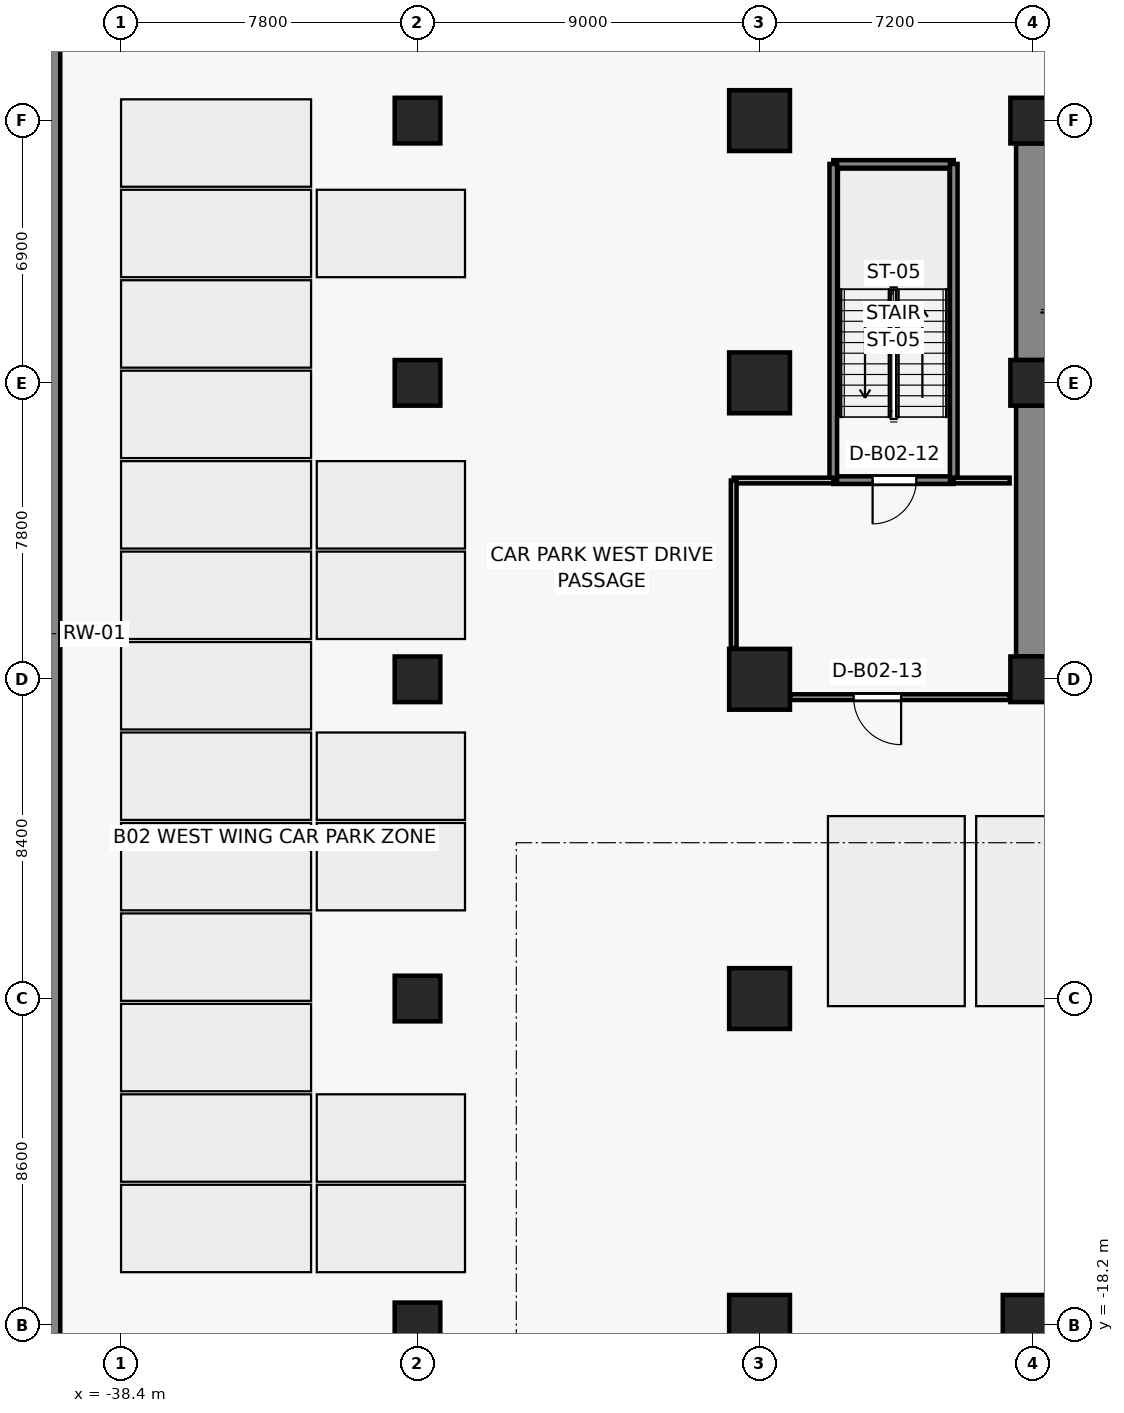
"""IFC4 building model, lengths in metres.
Left out: names, types, materials, properties, quantities, classifications, styles, units other than length and angle.
Written with IfcOpenShell. Run it as: python <this file> out.ifc"""

import sys

from ifc_helpers import new_model, si_unit, direction, frame, frame_2d, origin, origin_2d, place, context, subcontext, project, spatial, rectangle, extrude, source, transform, mapped, element, fill, save


model = new_model("IFC4")
c1 = context("Model", 3, precision=1e-05, world=origin(), true_north=direction((0.0, 1.0)))
c2 = subcontext(c1, "Body", "Model", "MODEL_VIEW")
j1 = project(units=[si_unit("LENGTHUNIT", "METRE"), si_unit("PLANEANGLEUNIT", "RADIAN")], contexts=[c1])
p1 = place(None, origin())
s1 = spatial("IfcSite", under=j1, at=p1, CompositionType="ELEMENT")
p2 = place(p1, origin())
s2 = spatial("IfcBuilding", under=s1, at=p2, CompositionType="ELEMENT")
p3 = place(p2, frame((0.0, 0.0, -8.8)))
s3 = spatial("IfcBuildingStorey", under=s2, at=p3, CompositionType="ELEMENT", Elevation=-8.8)
p4 = place(p3, frame((-40.4, -22.8, 0.0), z_axis=(0.0, 0.0, 1.0), x_axis=(0.0, 1.0, 0.0)))
e1 = element("IfcWall", 1, at=p4, inside=s3, PredefinedType="USERDEFINED", context=c2, shape_type="SweptSolid", body=[
    extrude(rectangle(XDim=45.6, YDim=0.8, at=frame_2d((22.8, 0.0))), origin(), (0.0, 0.0, 1.0), 4.12),
])
for number, where, z_axis, x_axis in (
    (2, (-14.4, -1.2, 0.0), (0.0, 0.0, 1.0), (1.0, 0.0, 0.0)),
    (3, (-14.4, 6.6, 0.0), (0.0, 0.0, 1.0), (1.0, 0.0, 0.0)),
    (4, (-14.4, 13.5, 0.0), (0.0, 0.0, 1.0), (1.0, 0.0, 0.0)),
):
    element("IfcColumn", number, at=place(p3, frame(where, z_axis=z_axis, x_axis=x_axis)), inside=s3, PredefinedType="COLUMN", context=c2, shape_type="SweptSolid", body=[
        extrude(rectangle(XDim=1.2, YDim=1.2, at=origin_2d()), origin(), (0.0, 0.0, 1.0), 4.4),
    ])
for number, where, z_axis, x_axis in (
    (5, (-21.6, -18.2, 0.0), (0.0, 0.0, 1.0), (1.0, 0.0, 0.0)),
    (6, (-14.4, -18.2, 0.0), (0.0, 0.0, 1.0), (1.0, 0.0, 0.0)),
    (7, (-21.6, -9.6, 0.0), (0.0, 0.0, 1.0), (1.0, 0.0, 0.0)),
    (8, (-21.6, -1.2, 0.0), (0.0, 0.0, 1.0), (1.0, 0.0, 0.0)),
    (9, (-21.6, 6.6, 0.0), (0.0, 0.0, 1.0), (1.0, 0.0, 0.0)),
    (10, (-21.6, 13.5, 0.0), (0.0, 0.0, 1.0), (1.0, 0.0, 0.0)),
):
    element("IfcColumn", number, at=place(p3, frame(where, z_axis=z_axis, x_axis=x_axis)), inside=s3, PredefinedType="COLUMN", context=c2, shape_type="SweptSolid", body=[
        extrude(rectangle(XDim=1.6, YDim=1.6, at=origin_2d()), origin(), (0.0, 0.0, 1.0), 4.4),
    ])
for number, where, z_axis, x_axis in (
    (11, (-30.6, -18.2, 0.0), (0.0, 0.0, 1.0), (1.0, 0.0, 0.0)),
    (12, (-30.6, -9.6, 0.0), (0.0, 0.0, 1.0), (1.0, 0.0, 0.0)),
    (13, (-30.6, -1.2, 0.0), (0.0, 0.0, 1.0), (1.0, 0.0, 0.0)),
    (14, (-30.6, 6.6, 0.0), (0.0, 0.0, 1.0), (1.0, 0.0, 0.0)),
    (15, (-30.6, 13.5, 0.0), (0.0, 0.0, 1.0), (1.0, 0.0, 0.0)),
):
    element("IfcColumn", number, at=place(p3, frame(where, z_axis=z_axis, x_axis=x_axis)), inside=s3, PredefinedType="COLUMN", context=c2, shape_type="SweptSolid", body=[
        extrude(rectangle(XDim=1.2, YDim=1.2, at=origin_2d()), origin(), (0.0, 0.0, 1.0), 4.4),
    ])
p5 = place(p3, frame((-14.4, -0.6, 0.0), z_axis=(0.0, 0.0, 1.0), x_axis=(0.0, 1.0, 0.0)))
e16 = element("IfcWall", 16, at=p5, inside=s3, PredefinedType="SHEAR", context=c2, shape_type="SweptSolid", body=[
    extrude(rectangle(XDim=6.6, YDim=0.9, at=frame_2d((3.3, 0.0))), origin(), (0.0, 0.0, 1.0), 4.12),
])
p6 = place(p3, frame((-14.4, 7.2, 0.0), z_axis=(0.0, 0.0, 1.0), x_axis=(0.0, 1.0, 0.0)))
e17 = element("IfcWall", 17, at=p6, inside=s3, PredefinedType="SHEAR", context=c2, shape_type="SweptSolid", body=[
    extrude(rectangle(XDim=5.7, YDim=0.9, at=frame_2d((2.85, 0.0))), origin(), (0.0, 0.0, 1.0), 4.12),
])
p7 = place(p3, frame((-16.49, 4.04, 0.0), z_axis=(0.0, 0.0, 1.0), x_axis=(-1.0, 0.0, 0.0)))
e18 = element("IfcWall", 18, at=p7, inside=s3, PredefinedType="SOLIDWALL", context=c2, shape_type="SweptSolid", body=[
    extrude(rectangle(XDim=3.17, YDim=0.2, at=frame_2d((1.585, 0.0))), origin(), (0.0, 0.0, 1.0), 4.12),
])
p8 = place(p7, frame((0.985, 0.0, 0.0)))
e19 = element("IfcOpeningElement", 19, at=p8, cuts=e18, PredefinedType="OPENING", context=c2, shape_type="SweptSolid", body=[
    extrude(rectangle(XDim=1.15, YDim=2.15, at=frame_2d((0.575, 1.075))), frame((0.0, 0.11, 0.0), z_axis=(0.0, -1.0, 0.0), x_axis=(1.0, 0.0, 0.0)), (0.0, 0.0, 1.0), 0.22),
])
p9 = place(p3, frame((-19.66, 12.36, 0.0), z_axis=(0.0, 0.0, 1.0), x_axis=(1.0, 0.0, 0.0)))
e20 = element("IfcWall", 20, at=p9, inside=s3, PredefinedType="SOLIDWALL", context=c2, shape_type="SweptSolid", body=[
    extrude(rectangle(XDim=3.17, YDim=0.2, at=frame_2d((1.585, 0.0))), origin(), (0.0, 0.0, 1.0), 4.12),
])
for number, where, z_axis, x_axis in (
    (21, (-19.66, 4.04, 0.0), (0.0, 0.0, 1.0), (0.0, 1.0, 0.0)),
    (22, (-16.49, 12.36, 0.0), (0.0, 0.0, 1.0), (0.0, -1.0, 0.0)),
):
    element("IfcWall", number, at=place(p3, frame(where, z_axis=z_axis, x_axis=x_axis)), inside=s3, PredefinedType="SOLIDWALL", context=c2, shape_type="SweptSolid", body=[
        extrude(rectangle(XDim=8.32, YDim=0.2, at=frame_2d((4.16, 0.0))), origin(), (0.0, 0.0, 1.0), 4.12),
    ])
p10 = place(p3, frame((-15.02, -1.67, 0.0), z_axis=(0.0, 0.0, 1.0), x_axis=(-1.0, 0.0, 0.0)))
e23 = element("IfcWall", 23, at=p10, inside=s3, PredefinedType="PARTITIONING", context=c2, shape_type="SweptSolid", body=[
    extrude(rectangle(XDim=5.76, YDim=0.15, at=frame_2d((2.88, 0.0))), origin(), (0.0, 0.0, 1.0), 4.12),
])
p11 = place(p10, frame((2.855, 0.0, 0.0)))
e24 = element("IfcOpeningElement", 24, at=p11, cuts=e23, PredefinedType="OPENING", context=c2, shape_type="SweptSolid", body=[
    extrude(rectangle(XDim=1.25, YDim=2.15, at=frame_2d((0.625, 1.075))), frame((0.0, 0.085, 0.0), z_axis=(0.0, -1.0, 0.0), x_axis=(1.0, 0.0, 0.0)), (0.0, 0.0, 1.0), 0.17),
])
p12 = place(p3, frame((-22.28, 4.03, 0.0), z_axis=(0.0, 0.0, 1.0), x_axis=(1.0, 0.0, 0.0)))
e25 = element("IfcWall", 25, at=p12, inside=s3, PredefinedType="PARTITIONING", context=c2, shape_type="SweptSolid", body=[
    extrude(rectangle(XDim=2.62, YDim=0.15, at=frame_2d((1.31, 0.0))), origin(), (0.0, 0.0, 1.0), 3.41),
])
p13 = place(p3, frame((-16.49, 4.03, 0.0), z_axis=(0.0, 0.0, 1.0), x_axis=(1.0, 0.0, 0.0)))
e26 = element("IfcWall", 26, at=p13, inside=s3, PredefinedType="PARTITIONING", context=c2, shape_type="SweptSolid", body=[
    extrude(rectangle(XDim=1.47, YDim=0.15, at=frame_2d((0.735, 0.0))), origin(), (0.0, 0.0, 1.0), 4.12),
])
p14 = place(p3, frame((-22.28, -0.38, 0.0), z_axis=(0.0, 0.0, 1.0), x_axis=(0.0, 1.0, 0.0)))
e27 = element("IfcWall", 27, at=p14, inside=s3, PredefinedType="PARTITIONING", context=c2, shape_type="SweptSolid", body=[
    extrude(rectangle(XDim=4.41, YDim=0.15, at=frame_2d((2.205, 0.0))), origin(), (0.0, 0.0, 1.0), 3.493),
])
m1 = source(origin(), c2, "Body", "SweptSolid", [
    extrude(rectangle(XDim=1.15, YDim=2.15, at=frame_2d((0.575, 1.075))), frame((0.0, 0.025, 0.0), z_axis=(0.0, -1.0, 0.0), x_axis=(1.0, 0.0, 0.0)), (0.0, 0.0, 1.0), 0.05),
])
p15 = place(p8, origin())
e28 = element("IfcDoor", 28, at=p15, inside=s3, OperationType="SINGLE_SWING_RIGHT", PredefinedType="DOOR", context=c2, shape_type="MappedRepresentation", body=[
    mapped(m1, transform((0.0, 0.0, 0.0), x_axis=(1.0, 0.0, 0.0), y_axis=(0.0, 1.0, 0.0), z_axis=(0.0, 0.0, 1.0), scale=1.0)),
])
fill(e19, e28)
m2 = source(origin(), c2, "Body", "SweptSolid", [
    extrude(rectangle(XDim=1.25, YDim=2.15, at=frame_2d((0.625, 1.075))), frame((0.0, 0.025, 0.0), z_axis=(0.0, -1.0, 0.0), x_axis=(1.0, 0.0, 0.0)), (0.0, 0.0, 1.0), 0.05),
])
p16 = place(p11, origin())
e29 = element("IfcDoor", 29, at=p16, inside=s3, OperationType="SINGLE_SWING_LEFT", PredefinedType="DOOR", context=c2, shape_type="MappedRepresentation", body=[
    mapped(m2, transform((0.0, 0.0, 0.0), x_axis=(1.0, 0.0, 0.0), y_axis=(0.0, 1.0, 0.0), z_axis=(0.0, 0.0, 1.0), scale=1.0)),
])
fill(e24, e29)
save(model, sys.argv[1])
